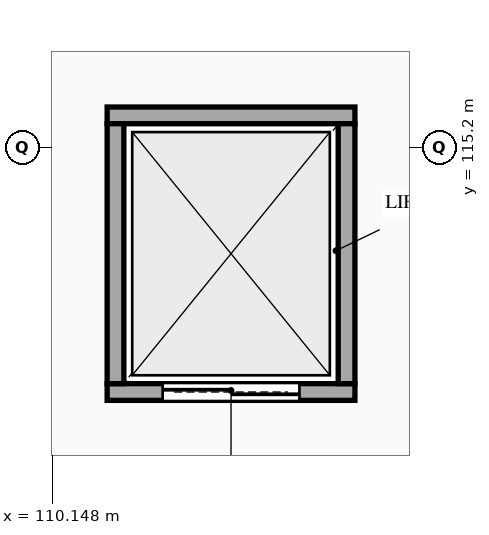
"""IFC4 building model, lengths in metres.
Left out: names, types, materials, properties, quantities, classifications, styles, units other than length and angle.
Written with IfcOpenShell. Run it as: python <this file> out.ifc"""

import sys

from ifc_helpers import new_model, si_unit, direction, frame, frame_2d, origin, place, context, subcontext, project, spatial, rectangle, extrude, element, fill, save


model = new_model("IFC4")
c1 = context("Model", 3, precision=1e-05, world=origin(), true_north=direction((0.0, 1.0)))
c2 = subcontext(c1, "Body", "Model", "MODEL_VIEW")
j1 = project(units=[si_unit("LENGTHUNIT", "METRE"), si_unit("PLANEANGLEUNIT", "RADIAN")], contexts=[c1])
p1 = place(None, origin())
s1 = spatial("IfcSite", under=j1, at=p1, CompositionType="ELEMENT")
p2 = place(p1, origin())
s2 = spatial("IfcBuilding", under=s1, at=p2, CompositionType="ELEMENT")
p3 = place(p2, frame((0.0, 0.0, 5.4)))
s3 = spatial("IfcBuildingStorey", under=s2, at=p3, CompositionType="ELEMENT", Elevation=5.4)
p4 = place(p3, frame((110.87, 111.98, 0.0), z_axis=(0.0, 0.0, 1.0), x_axis=(1.0, 0.0, 0.0)))
e1 = element("IfcWall", 1, at=p4, inside=s3, PredefinedType="STANDARD", context=c2, shape_type="SweptSolid", body=[
    extrude(rectangle(XDim=3.26, YDim=0.22, at=frame_2d((1.63, 0.0))), origin(), (0.0, 0.0, 1.0), 5.12),
])
p5 = place(p4, frame((0.73, 0.0, 0.0)))
e2 = element("IfcOpeningElement", 2, at=p5, cuts=e1, PredefinedType="OPENING", context=c2, shape_type="SweptSolid", body=[
    extrude(rectangle(XDim=1.8, YDim=2.35, at=frame_2d((0.9, 1.175))), frame((0.0, 0.12, 0.0), z_axis=(0.0, -1.0, 0.0), x_axis=(1.0, 0.0, 0.0)), (0.0, 0.0, 1.0), 0.24),
])
p6 = place(p3, frame((114.13, 115.62, 0.0), z_axis=(0.0, 0.0, 1.0), x_axis=(-1.0, 0.0, 0.0)))
e3 = element("IfcWall", 3, at=p6, inside=s3, PredefinedType="STANDARD", context=c2, shape_type="SweptSolid", body=[
    extrude(rectangle(XDim=3.26, YDim=0.22, at=frame_2d((1.63, 0.0))), origin(), (0.0, 0.0, 1.0), 5.12),
])
for number, where, z_axis, x_axis in (
    (4, (110.98, 115.51, 0.0), (0.0, 0.0, 1.0), (0.0, -1.0, 0.0)),
    (5, (114.02, 112.09, 0.0), (0.0, 0.0, 1.0), (0.0, 1.0, 0.0)),
):
    element("IfcWall", number, at=place(p3, frame(where, z_axis=z_axis, x_axis=x_axis)), inside=s3, PredefinedType="STANDARD", context=c2, shape_type="SweptSolid", body=[
        extrude(rectangle(XDim=3.42, YDim=0.22, at=frame_2d((1.71, 0.0))), origin(), (0.0, 0.0, 1.0), 5.12),
    ])
p7 = place(p5, origin())
e6 = element("IfcDoor", 6, at=p7, inside=s3, OperationType="DOUBLE_DOOR_SLIDING", PredefinedType="DOOR", context=c2, shape_type="SweptSolid", body=[
    extrude(rectangle(XDim=1.8, YDim=2.35, at=frame_2d((0.9, 1.175))), frame((0.0, 0.025, 0.0), z_axis=(0.0, -1.0, 0.0), x_axis=(1.0, 0.0, 0.0)), (0.0, 0.0, 1.0), 0.05),
])
fill(e2, e6)
save(model, sys.argv[1])
